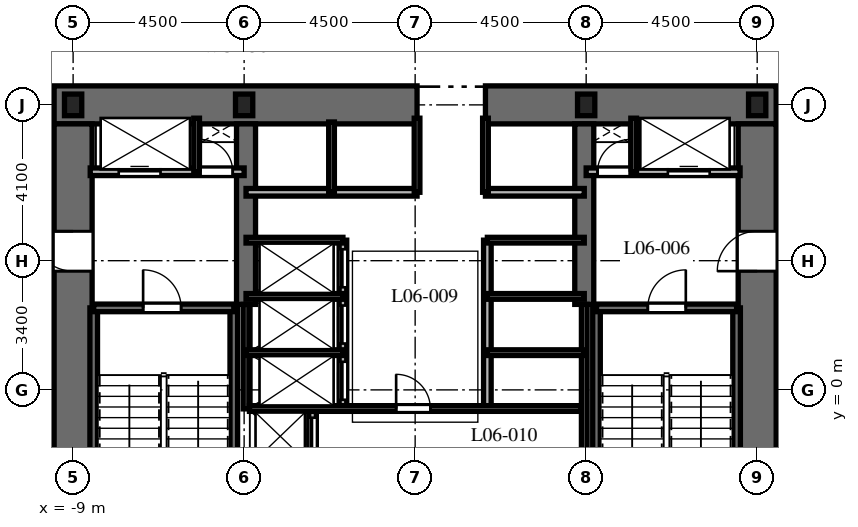
"""IFC4 building model, lengths in metres.
Left out: names, types, materials, properties, quantities, classifications, styles, units other than length and angle.
Written with IfcOpenShell. Run it as: python <this file> out.ifc"""

import sys

from ifc_helpers import new_model, si_unit, direction, frame, frame_2d, origin, origin_2d, place, context, subcontext, project, spatial, rectangle, i_section, extrude, element, fill, save


model = new_model("IFC4")
c1 = context("Model", 3, precision=1e-05, world=origin(), true_north=direction((0.0, 1.0)))
c2 = subcontext(c1, "Body", "Model", "MODEL_VIEW")
j1 = project(units=[si_unit("LENGTHUNIT", "METRE"), si_unit("PLANEANGLEUNIT", "RADIAN")], contexts=[c1])
p1 = place(None, origin())
s1 = spatial("IfcSite", under=j1, at=p1, CompositionType="ELEMENT")
p2 = place(p1, origin())
s2 = spatial("IfcBuilding", under=s1, at=p2, CompositionType="ELEMENT")
p3 = place(p2, frame((0.0, 0.0, 34.2)))
s3 = spatial("IfcBuildingStorey", under=s2, at=p3, CompositionType="ELEMENT", Elevation=34.2)
p4 = place(p3, frame((-9.5, 7.5, 0.0), z_axis=(0.0, 0.0, 1.0), x_axis=(1.0, 0.0, 0.0)))
e1 = element("IfcWall", 1, at=p4, inside=s3, PredefinedType="SHEAR", context=c2, shape_type="SweptSolid", body=[
    extrude(rectangle(XDim=9.55, YDim=1.0, at=frame_2d((4.775, 0.0))), origin(), (0.0, 0.0, 1.0), 3.7),
])
p5 = place(p3, frame((1.85, 7.5, 0.0), z_axis=(0.0, 0.0, 1.0), x_axis=(1.0, 0.0, 0.0)))
e2 = element("IfcWall", 2, at=p5, inside=s3, PredefinedType="SHEAR", context=c2, shape_type="SweptSolid", body=[
    extrude(rectangle(XDim=7.65, YDim=1.0, at=frame_2d((3.825, 0.0))), origin(), (0.0, 0.0, 1.0), 3.7),
])
p6 = place(p3, frame((-9.0, -7.0, 0.0), z_axis=(0.0, 0.0, 1.0), x_axis=(0.0, 1.0, 0.0)))
e3 = element("IfcWall", 3, at=p6, inside=s3, PredefinedType="SHEAR", context=c2, shape_type="SweptSolid", body=[
    extrude(rectangle(XDim=14.0, YDim=1.0, at=frame_2d((7.0, 0.0))), origin(), (0.0, 0.0, 1.0), 3.7),
])
p7 = place(p6, frame((10.125, 0.0, 0.0)))
e4 = element("IfcOpeningElement", 4, at=p7, cuts=e3, PredefinedType="OPENING", context=c2, shape_type="SweptSolid", body=[
    extrude(rectangle(XDim=1.05, YDim=2.15, at=frame_2d((0.525, 1.075))), frame((0.0, 0.51, 0.0), z_axis=(0.0, -1.0, 0.0), x_axis=(1.0, 0.0, 0.0)), (0.0, 0.0, 1.0), 1.02),
])
p8 = place(p3, frame((9.0, -7.0, 0.0), z_axis=(0.0, 0.0, 1.0), x_axis=(0.0, 1.0, 0.0)))
e5 = element("IfcWall", 5, at=p8, inside=s3, PredefinedType="SHEAR", context=c2, shape_type="SweptSolid", body=[
    extrude(rectangle(XDim=14.0, YDim=1.0, at=frame_2d((7.0, 0.0))), origin(), (0.0, 0.0, 1.0), 3.7),
])
p9 = place(p8, frame((10.125, 0.0, 0.0)))
e6 = element("IfcOpeningElement", 6, at=p9, cuts=e5, PredefinedType="OPENING", context=c2, shape_type="SweptSolid", body=[
    extrude(rectangle(XDim=1.05, YDim=2.15, at=frame_2d((0.525, 1.075))), frame((0.0, 0.51, 0.0), z_axis=(0.0, -1.0, 0.0), x_axis=(1.0, 0.0, 0.0)), (0.0, 0.0, 1.0), 1.02),
])
for number, where, z_axis, x_axis in (
    (7, (-4.45, 2.25, 0.0), (0.0, 0.0, 1.0), (0.0, 1.0, 0.0)),
    (8, (4.45, 2.25, 0.0), (0.0, 0.0, 1.0), (0.0, 1.0, 0.0)),
):
    element("IfcWall", number, at=place(p3, frame(where, z_axis=z_axis, x_axis=x_axis)), inside=s3, PredefinedType="SHEAR", context=c2, shape_type="SweptSolid", body=[
        extrude(rectangle(XDim=4.75, YDim=0.5, at=frame_2d((2.375, 0.0))), origin(), (0.0, 0.0, 1.0), 3.7),
    ])
for number, where, z_axis, x_axis in (
    (9, (-8.458, -6.985, 0.0), (0.0, 0.0, 1.0), (0.0, 1.0, 0.0)),
    (10, (-4.772, -6.985, 0.0), (0.0, 0.0, 1.0), (0.0, 1.0, 0.0)),
):
    element("IfcWall", number, at=place(p3, frame(where, z_axis=z_axis, x_axis=x_axis)), inside=s3, PredefinedType="SHEAR", context=c2, shape_type="SweptSolid", body=[
        extrude(rectangle(XDim=9.143, YDim=0.2, at=frame_2d((4.572, 0.0))), origin(), (0.0, 0.0, 1.0), 3.7),
    ])
p10 = place(p3, frame((-8.458, 2.158, 0.0), z_axis=(0.0, 0.0, 1.0), x_axis=(1.0, 0.0, 0.0)))
e11 = element("IfcWall", 11, at=p10, inside=s3, PredefinedType="SHEAR", context=c2, shape_type="SweptSolid", body=[
    extrude(rectangle(XDim=3.686, YDim=0.2, at=frame_2d((1.843, 0.0))), origin(), (0.0, 0.0, 1.0), 3.7),
])
p11 = place(p10, frame((1.3, 0.0, 0.0)))
e12 = element("IfcOpeningElement", 12, at=p11, cuts=e11, PredefinedType="OPENING", context=c2, shape_type="SweptSolid", body=[
    extrude(rectangle(XDim=1.0, YDim=2.15, at=frame_2d((0.5, 1.075))), frame((0.0, 0.11, 0.0), z_axis=(0.0, -1.0, 0.0), x_axis=(1.0, 0.0, 0.0)), (0.0, 0.0, 1.0), 0.22),
])
for number, where, z_axis, x_axis in (
    (13, (4.772, -6.985, 0.0), (0.0, 0.0, 1.0), (0.0, 1.0, 0.0)),
    (14, (8.458, -6.985, 0.0), (0.0, 0.0, 1.0), (0.0, 1.0, 0.0)),
):
    element("IfcWall", number, at=place(p3, frame(where, z_axis=z_axis, x_axis=x_axis)), inside=s3, PredefinedType="SHEAR", context=c2, shape_type="SweptSolid", body=[
        extrude(rectangle(XDim=9.143, YDim=0.2, at=frame_2d((4.572, 0.0))), origin(), (0.0, 0.0, 1.0), 3.7),
    ])
p12 = place(p3, frame((4.772, 2.158, 0.0), z_axis=(0.0, 0.0, 1.0), x_axis=(1.0, 0.0, 0.0)))
e15 = element("IfcWall", 15, at=p12, inside=s3, PredefinedType="SHEAR", context=c2, shape_type="SweptSolid", body=[
    extrude(rectangle(XDim=3.686, YDim=0.2, at=frame_2d((1.843, 0.0))), origin(), (0.0, 0.0, 1.0), 3.7),
])
p13 = place(p12, frame((1.35, 0.0, 0.0)))
e16 = element("IfcOpeningElement", 16, at=p13, cuts=e15, PredefinedType="OPENING", context=c2, shape_type="SweptSolid", body=[
    extrude(rectangle(XDim=1.0, YDim=2.15, at=frame_2d((0.5, 1.075))), frame((0.0, 0.11, 0.0), z_axis=(0.0, -1.0, 0.0), x_axis=(1.0, 0.0, 0.0)), (0.0, 0.0, 1.0), 0.22),
])
for number, where, z_axis, x_axis in (
    (17, (9.0, 7.5, 0.0), (0.0, 0.0, 1.0), (1.0, 0.0, 0.0)),
    (18, (4.5, 7.5, 0.0), (0.0, 0.0, 1.0), (1.0, 0.0, 0.0)),
    (19, (-4.5, 7.5, 0.0), (0.0, 0.0, 1.0), (1.0, 0.0, 0.0)),
    (20, (-9.0, 7.5, 0.0), (0.0, 0.0, 1.0), (1.0, 0.0, 0.0)),
):
    element("IfcColumn", number, at=place(p3, frame(where, z_axis=z_axis, x_axis=x_axis)), inside=s3, PredefinedType="COLUMN", context=c2, shape_type="SweptSolid", body=[
        extrude(i_section(OverallWidth=0.454, OverallDepth=0.569, WebThickness=0.078, FlangeThickness=0.125, at=origin_2d()), origin(), (0.0, 0.0, 1.0), 3.7),
    ])
p14 = place(p3, frame((-8.55, 5.74, 0.0), z_axis=(0.0, 0.0, 1.0), x_axis=(1.0, 0.0, 0.0)))
e21 = element("IfcWall", 21, at=p14, inside=s3, PredefinedType="PARTITIONING", context=c2, shape_type="SweptSolid", body=[
    extrude(rectangle(XDim=4.05, YDim=0.2, at=frame_2d((2.025, 0.0))), origin(), (0.0, 0.0, 1.0), 3.4),
])
p15 = place(p14, frame((0.75, 0.0, 0.0)))
e22 = element("IfcOpeningElement", 22, at=p15, cuts=e21, PredefinedType="OPENING", context=c2, shape_type="SweptSolid", body=[
    extrude(rectangle(XDim=1.1, YDim=2.2, at=frame_2d((0.55, 1.1))), frame((0.0, 0.11, 0.0), z_axis=(0.0, -1.0, 0.0), x_axis=(1.0, 0.0, 0.0)), (0.0, 0.0, 1.0), 0.22),
])
p16 = place(p14, frame((2.9, 0.0, 0.0)))
e23 = element("IfcOpeningElement", 23, at=p16, cuts=e21, PredefinedType="OPENING", context=c2, shape_type="SweptSolid", body=[
    extrude(rectangle(XDim=0.85, YDim=2.03, at=frame_2d((0.425, 1.015))), frame((0.0, 0.11, 0.0), z_axis=(0.0, -1.0, 0.0), x_axis=(1.0, 0.0, 0.0)), (0.0, 0.0, 1.0), 0.22),
])
p17 = place(p3, frame((-5.75, 5.74, 0.0), z_axis=(0.0, 0.0, 1.0), x_axis=(0.0, 1.0, 0.0)))
e24 = element("IfcWall", 24, at=p17, inside=s3, PredefinedType="PARTITIONING", context=c2, shape_type="SweptSolid", body=[
    extrude(rectangle(XDim=1.41, YDim=0.15, at=frame_2d((0.705, 0.0))), origin(), (0.0, 0.0, 1.0), 3.4),
])
p18 = place(p3, frame((4.5, 5.74, 0.0), z_axis=(0.0, 0.0, 1.0), x_axis=(1.0, 0.0, 0.0)))
e25 = element("IfcWall", 25, at=p18, inside=s3, PredefinedType="PARTITIONING", context=c2, shape_type="SweptSolid", body=[
    extrude(rectangle(XDim=4.05, YDim=0.2, at=frame_2d((2.025, 0.0))), origin(), (0.0, 0.0, 1.0), 3.4),
])
p19 = place(p18, frame((0.3, 0.0, 0.0)))
e26 = element("IfcOpeningElement", 26, at=p19, cuts=e25, PredefinedType="OPENING", context=c2, shape_type="SweptSolid", body=[
    extrude(rectangle(XDim=0.85, YDim=2.03, at=frame_2d((0.425, 1.015))), frame((0.0, 0.11, 0.0), z_axis=(0.0, -1.0, 0.0), x_axis=(1.0, 0.0, 0.0)), (0.0, 0.0, 1.0), 0.22),
])
p20 = place(p18, frame((2.15, 0.0, 0.0)))
e27 = element("IfcOpeningElement", 27, at=p20, cuts=e25, PredefinedType="OPENING", context=c2, shape_type="SweptSolid", body=[
    extrude(rectangle(XDim=1.1, YDim=2.2, at=frame_2d((0.55, 1.1))), frame((0.0, 0.11, 0.0), z_axis=(0.0, -1.0, 0.0), x_axis=(1.0, 0.0, 0.0)), (0.0, 0.0, 1.0), 0.22),
])
p21 = place(p3, frame((5.75, 5.74, 0.0), z_axis=(0.0, 0.0, 1.0), x_axis=(0.0, 1.0, 0.0)))
e28 = element("IfcWall", 28, at=p21, inside=s3, PredefinedType="PARTITIONING", context=c2, shape_type="SweptSolid", body=[
    extrude(rectangle(XDim=1.41, YDim=0.15, at=frame_2d((0.705, 0.0))), origin(), (0.0, 0.0, 1.0), 3.4),
])
p22 = place(p3, frame((-2.7, -1.972, 0.0), z_axis=(0.0, 0.0, 1.0), x_axis=(0.0, 1.0, 0.0)))
e29 = element("IfcWall", 29, at=p22, inside=s3, PredefinedType="PARTITIONING", context=c2, shape_type="SweptSolid", body=[
    extrude(rectangle(XDim=1.472, YDim=0.2, at=frame_2d((0.736, 0.0))), origin(), (0.0, 0.0, 1.0), 3.4),
])
p23 = place(p22, frame((0.24, 0.0, 0.0)))
e30 = element("IfcOpeningElement", 30, at=p23, cuts=e29, PredefinedType="OPENING", context=c2, shape_type="SweptSolid", body=[
    extrude(rectangle(XDim=1.0, YDim=2.2, at=frame_2d((0.5, 1.1))), frame((0.0, 0.11, 0.0), z_axis=(0.0, -1.0, 0.0), x_axis=(1.0, 0.0, 0.0)), (0.0, 0.0, 1.0), 0.22),
])
p24 = place(p3, frame((-4.45, 5.2, 0.0), z_axis=(0.0, 0.0, 1.0), x_axis=(1.0, 0.0, 0.0)))
e31 = element("IfcWall", 31, at=p24, inside=s3, PredefinedType="PARTITIONING", context=c2, shape_type="SweptSolid", body=[
    extrude(rectangle(XDim=4.5, YDim=0.2, at=frame_2d((2.25, 0.0))), origin(), (0.0, 0.0, 1.0), 3.4),
])
p25 = place(p3, frame((1.85, 5.2, 0.0), z_axis=(0.0, 0.0, 1.0), x_axis=(1.0, 0.0, 0.0)))
e32 = element("IfcWall", 32, at=p25, inside=s3, PredefinedType="PARTITIONING", context=c2, shape_type="SweptSolid", body=[
    extrude(rectangle(XDim=2.6, YDim=0.2, at=frame_2d((1.3, 0.0))), origin(), (0.0, 0.0, 1.0), 3.4),
])
p26 = place(p3, frame((-2.2, 5.2, 0.0), z_axis=(0.0, 0.0, 1.0), x_axis=(0.0, 1.0, 0.0)))
e33 = element("IfcWall", 33, at=p26, inside=s3, PredefinedType="PARTITIONING", context=c2, shape_type="SweptSolid", body=[
    extrude(rectangle(XDim=1.85, YDim=0.15, at=frame_2d((0.925, 0.0))), origin(), (0.0, 0.0, 1.0), 3.4),
])
for number, where, z_axis, x_axis in (
    (34, (0.05, 5.2, 0.0), (0.0, 0.0, 1.0), (0.0, 1.0, 0.0)),
    (35, (1.85, 5.2, 0.0), (0.0, 0.0, 1.0), (0.0, 1.0, 0.0)),
):
    element("IfcWall", number, at=place(p3, frame(where, z_axis=z_axis, x_axis=x_axis)), inside=s3, PredefinedType="PARTITIONING", context=c2, shape_type="SweptSolid", body=[
        extrude(rectangle(XDim=1.95, YDim=0.15, at=frame_2d((0.975, 0.0))), origin(), (0.0, 0.0, 1.0), 3.4),
    ])
p27 = place(p3, frame((-4.45, -0.5, 0.0), z_axis=(0.0, 0.0, 1.0), x_axis=(0.0, 1.0, 0.0)))
e36 = element("IfcWall", 36, at=p27, inside=s3, PredefinedType="PARTITIONING", context=c2, shape_type="SweptSolid", body=[
    extrude(rectangle(XDim=2.75, YDim=0.15, at=frame_2d((1.375, 0.0))), origin(), (0.0, 0.0, 1.0), 3.4),
])
p28 = place(p3, frame((4.45, -1.972, 0.0), z_axis=(0.0, 0.0, 1.0), x_axis=(0.0, 1.0, 0.0)))
e37 = element("IfcWall", 37, at=p28, inside=s3, PredefinedType="PARTITIONING", context=c2, shape_type="SweptSolid", body=[
    extrude(rectangle(XDim=4.222, YDim=0.15, at=frame_2d((2.111, 0.0))), origin(), (0.0, 0.0, 1.0), 3.4),
])
p29 = place(p3, frame((-1.9, -0.5, 0.0), z_axis=(0.0, 0.0, 1.0), x_axis=(0.0, 1.0, 0.0)))
e38 = element("IfcWall", 38, at=p29, inside=s3, PredefinedType="PARTITIONING", context=c2, shape_type="SweptSolid", body=[
    extrude(rectangle(XDim=4.44, YDim=0.2, at=frame_2d((2.22, 0.0))), origin(), (0.0, 0.0, 1.0), 3.4),
])
p30 = place(p29, frame((0.24, 0.0, 0.0)))
e39 = element("IfcOpeningElement", 39, at=p30, cuts=e38, PredefinedType="OPENING", context=c2, shape_type="SweptSolid", body=[
    extrude(rectangle(XDim=1.0, YDim=2.2, at=frame_2d((0.5, 1.1))), frame((0.0, 0.11, 0.0), z_axis=(0.0, -1.0, 0.0), x_axis=(1.0, 0.0, 0.0)), (0.0, 0.0, 1.0), 0.22),
])
p31 = place(p29, frame((1.72, 0.0, 0.0)))
e40 = element("IfcOpeningElement", 40, at=p31, cuts=e38, PredefinedType="OPENING", context=c2, shape_type="SweptSolid", body=[
    extrude(rectangle(XDim=1.0, YDim=2.2, at=frame_2d((0.5, 1.1))), frame((0.0, 0.11, 0.0), z_axis=(0.0, -1.0, 0.0), x_axis=(1.0, 0.0, 0.0)), (0.0, 0.0, 1.0), 0.22),
])
p32 = place(p29, frame((3.2, 0.0, 0.0)))
e41 = element("IfcOpeningElement", 41, at=p32, cuts=e38, PredefinedType="OPENING", context=c2, shape_type="SweptSolid", body=[
    extrude(rectangle(XDim=1.0, YDim=2.2, at=frame_2d((0.5, 1.1))), frame((0.0, 0.11, 0.0), z_axis=(0.0, -1.0, 0.0), x_axis=(1.0, 0.0, 0.0)), (0.0, 0.0, 1.0), 0.22),
])
for number, where, z_axis, x_axis in (
    (42, (-4.45, 3.94, 0.0), (0.0, 0.0, 1.0), (1.0, 0.0, 0.0)),
    (43, (-4.45, 0.98, 0.0), (0.0, 0.0, 1.0), (1.0, 0.0, 0.0)),
    (44, (-4.45, 2.46, 0.0), (0.0, 0.0, 1.0), (1.0, 0.0, 0.0)),
):
    element("IfcWall", number, at=place(p3, frame(where, z_axis=z_axis, x_axis=x_axis)), inside=s3, PredefinedType="PARTITIONING", context=c2, shape_type="SweptSolid", body=[
        extrude(rectangle(XDim=2.55, YDim=0.15, at=frame_2d((1.275, 0.0))), origin(), (0.0, 0.0, 1.0), 3.4),
    ])
p33 = place(p3, frame((1.9, -0.5, 0.0), z_axis=(0.0, 0.0, 1.0), x_axis=(0.0, 1.0, 0.0)))
e45 = element("IfcWall", 45, at=p33, inside=s3, PredefinedType="PARTITIONING", context=c2, shape_type="SweptSolid", body=[
    extrude(rectangle(XDim=4.44, YDim=0.2, at=frame_2d((2.22, 0.0))), origin(), (0.0, 0.0, 1.0), 3.4),
])
for number, where, z_axis, x_axis in (
    (46, (1.9, 3.94, 0.0), (0.0, 0.0, 1.0), (1.0, 0.0, 0.0)),
    (47, (1.9, 0.98, 0.0), (0.0, 0.0, 1.0), (1.0, 0.0, 0.0)),
    (48, (1.9, 2.46, 0.0), (0.0, 0.0, 1.0), (1.0, 0.0, 0.0)),
):
    element("IfcWall", number, at=place(p3, frame(where, z_axis=z_axis, x_axis=x_axis)), inside=s3, PredefinedType="PARTITIONING", context=c2, shape_type="SweptSolid", body=[
        extrude(rectangle(XDim=2.55, YDim=0.15, at=frame_2d((1.275, 0.0))), origin(), (0.0, 0.0, 1.0), 3.4),
    ])
p34 = place(p3, frame((-4.36, -0.49, 0.0), z_axis=(0.0, 0.0, 1.0), x_axis=(1.0, 0.0, 0.0)))
e49 = element("IfcWall", 49, at=p34, inside=s3, PredefinedType="PARTITIONING", context=c2, shape_type="SweptSolid", body=[
    extrude(rectangle(XDim=8.72, YDim=0.15, at=frame_2d((4.36, 0.0))), origin(), (0.0, 0.0, 1.0), 3.4),
])
p35 = place(p34, frame((3.86, 0.0, 0.0)))
e50 = element("IfcOpeningElement", 50, at=p35, cuts=e49, PredefinedType="OPENING", context=c2, shape_type="SweptSolid", body=[
    extrude(rectangle(XDim=0.9, YDim=2.03, at=frame_2d((0.45, 1.015))), frame((0.0, 0.085, 0.0), z_axis=(0.0, -1.0, 0.0), x_axis=(1.0, 0.0, 0.0)), (0.0, 0.0, 1.0), 0.17),
])
p36 = place(p11, origin())
e51 = element("IfcDoor", 51, at=p36, inside=s3, OperationType="SINGLE_SWING_LEFT", PredefinedType="DOOR", context=c2, shape_type="SweptSolid", body=[
    extrude(rectangle(XDim=1.0, YDim=2.15, at=frame_2d((0.5, 1.075))), frame((0.0, 0.025, 0.0), z_axis=(0.0, -1.0, 0.0), x_axis=(1.0, 0.0, 0.0)), (0.0, 0.0, 1.0), 0.05),
])
fill(e12, e51)
p37 = place(p13, origin())
e52 = element("IfcDoor", 52, at=p37, inside=s3, OperationType="SINGLE_SWING_RIGHT", PredefinedType="DOOR", context=c2, shape_type="SweptSolid", body=[
    extrude(rectangle(XDim=1.0, YDim=2.15, at=frame_2d((0.5, 1.075))), frame((0.0, 0.025, 0.0), z_axis=(0.0, -1.0, 0.0), x_axis=(1.0, 0.0, 0.0)), (0.0, 0.0, 1.0), 0.05),
])
fill(e16, e52)
p38 = place(p7, origin())
e53 = element("IfcDoor", 53, at=p38, inside=s3, OperationType="SINGLE_SWING_RIGHT", PredefinedType="DOOR", context=c2, shape_type="SweptSolid", body=[
    extrude(rectangle(XDim=1.05, YDim=2.15, at=frame_2d((0.525, 1.075))), frame((0.0, 0.025, 0.0), z_axis=(0.0, -1.0, 0.0), x_axis=(1.0, 0.0, 0.0)), (0.0, 0.0, 1.0), 0.05),
])
fill(e4, e53)
p39 = place(p9, origin())
e54 = element("IfcDoor", 54, at=p39, inside=s3, OperationType="SINGLE_SWING_LEFT", PredefinedType="DOOR", context=c2, shape_type="SweptSolid", body=[
    extrude(rectangle(XDim=1.05, YDim=2.15, at=frame_2d((0.525, 1.075))), frame((0.0, 0.025, 0.0), z_axis=(0.0, -1.0, 0.0), x_axis=(1.0, 0.0, 0.0)), (0.0, 0.0, 1.0), 0.05),
])
fill(e6, e54)
p40 = place(p15, origin())
e55 = element("IfcDoor", 55, at=p40, inside=s3, OperationType="SLIDING_TO_LEFT", PredefinedType="DOOR", context=c2, shape_type="SweptSolid", body=[
    extrude(rectangle(XDim=1.1, YDim=2.2, at=frame_2d((0.55, 1.1))), frame((0.0, 0.025, 0.0), z_axis=(0.0, -1.0, 0.0), x_axis=(1.0, 0.0, 0.0)), (0.0, 0.0, 1.0), 0.05),
])
fill(e22, e55)
p41 = place(p16, origin())
e56 = element("IfcDoor", 56, at=p41, inside=s3, OperationType="SINGLE_SWING_LEFT", PredefinedType="DOOR", context=c2, shape_type="SweptSolid", body=[
    extrude(rectangle(XDim=0.85, YDim=2.03, at=frame_2d((0.425, 1.015))), frame((0.0, 0.025, 0.0), z_axis=(0.0, -1.0, 0.0), x_axis=(1.0, 0.0, 0.0)), (0.0, 0.0, 1.0), 0.05),
])
fill(e23, e56)
p42 = place(p19, origin())
e57 = element("IfcDoor", 57, at=p42, inside=s3, OperationType="SINGLE_SWING_RIGHT", PredefinedType="DOOR", context=c2, shape_type="SweptSolid", body=[
    extrude(rectangle(XDim=0.85, YDim=2.03, at=frame_2d((0.425, 1.015))), frame((0.0, 0.025, 0.0), z_axis=(0.0, -1.0, 0.0), x_axis=(1.0, 0.0, 0.0)), (0.0, 0.0, 1.0), 0.05),
])
fill(e26, e57)
p43 = place(p20, origin())
e58 = element("IfcDoor", 58, at=p43, inside=s3, OperationType="SLIDING_TO_RIGHT", PredefinedType="DOOR", context=c2, shape_type="SweptSolid", body=[
    extrude(rectangle(XDim=1.1, YDim=2.2, at=frame_2d((0.55, 1.1))), frame((0.0, 0.025, 0.0), z_axis=(0.0, -1.0, 0.0), x_axis=(1.0, 0.0, 0.0)), (0.0, 0.0, 1.0), 0.05),
])
fill(e27, e58)
p44 = place(p23, origin())
e59 = element("IfcDoor", 59, at=p44, inside=s3, OperationType="SLIDING_TO_LEFT", PredefinedType="DOOR", context=c2, shape_type="SweptSolid", body=[
    extrude(rectangle(XDim=1.0, YDim=2.2, at=frame_2d((0.5, 1.1))), frame((0.0, 0.025, 0.0), z_axis=(0.0, -1.0, 0.0), x_axis=(1.0, 0.0, 0.0)), (0.0, 0.0, 1.0), 0.05),
])
fill(e30, e59)
p45 = place(p30, origin())
e60 = element("IfcDoor", 60, at=p45, inside=s3, OperationType="SLIDING_TO_LEFT", PredefinedType="DOOR", context=c2, shape_type="SweptSolid", body=[
    extrude(rectangle(XDim=1.0, YDim=2.2, at=frame_2d((0.5, 1.1))), frame((0.0, 0.025, 0.0), z_axis=(0.0, -1.0, 0.0), x_axis=(1.0, 0.0, 0.0)), (0.0, 0.0, 1.0), 0.05),
])
fill(e39, e60)
p46 = place(p31, origin())
e61 = element("IfcDoor", 61, at=p46, inside=s3, OperationType="SLIDING_TO_LEFT", PredefinedType="DOOR", context=c2, shape_type="SweptSolid", body=[
    extrude(rectangle(XDim=1.0, YDim=2.2, at=frame_2d((0.5, 1.1))), frame((0.0, 0.025, 0.0), z_axis=(0.0, -1.0, 0.0), x_axis=(1.0, 0.0, 0.0)), (0.0, 0.0, 1.0), 0.05),
])
fill(e40, e61)
p47 = place(p32, origin())
e62 = element("IfcDoor", 62, at=p47, inside=s3, OperationType="SLIDING_TO_LEFT", PredefinedType="DOOR", context=c2, shape_type="SweptSolid", body=[
    extrude(rectangle(XDim=1.0, YDim=2.2, at=frame_2d((0.5, 1.1))), frame((0.0, 0.025, 0.0), z_axis=(0.0, -1.0, 0.0), x_axis=(1.0, 0.0, 0.0)), (0.0, 0.0, 1.0), 0.05),
])
fill(e41, e62)
p48 = place(p35, origin())
e63 = element("IfcDoor", 63, at=p48, inside=s3, OperationType="SINGLE_SWING_LEFT", PredefinedType="DOOR", context=c2, shape_type="SweptSolid", body=[
    extrude(rectangle(XDim=0.9, YDim=2.03, at=frame_2d((0.45, 1.015))), frame((0.0, 0.025, 0.0), z_axis=(0.0, -1.0, 0.0), x_axis=(1.0, 0.0, 0.0)), (0.0, 0.0, 1.0), 0.05),
])
fill(e50, e63)
save(model, sys.argv[1])
